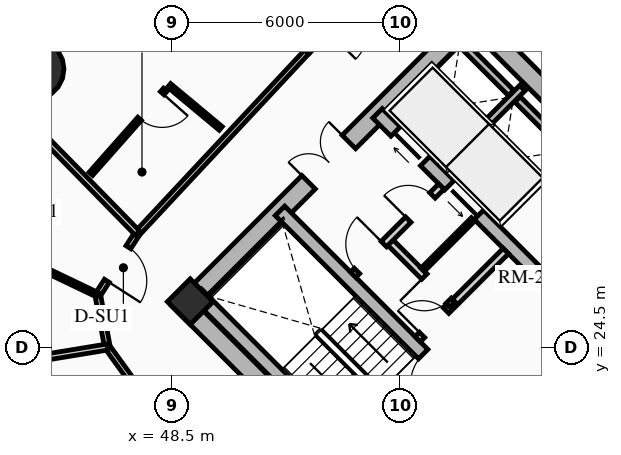
"""IFC4 building model, lengths in metres.
Left out: names, types, materials, properties, quantities, classifications, styles, units other than length and angle.
Written with IfcOpenShell. Run it as: python <this file> out.ifc"""

import sys

from ifc_helpers import new_model, si_unit, direction, frame, frame_2d, origin, origin_2d, place, context, subcontext, project, spatial, rectangle, circle, extrude, source, transform, mapped, element, fill, save


model = new_model("IFC4")
c1 = context("Model", 3, precision=1e-05, world=origin(), true_north=direction((0.0, 1.0)))
c2 = subcontext(c1, "Body", "Model", "MODEL_VIEW")
j1 = project(units=[si_unit("LENGTHUNIT", "METRE"), si_unit("PLANEANGLEUNIT", "RADIAN")], contexts=[c1])
p1 = place(None, origin())
s1 = spatial("IfcSite", under=j1, at=p1, CompositionType="ELEMENT")
p2 = place(p1, origin())
s2 = spatial("IfcBuilding", under=s1, at=p2, CompositionType="ELEMENT")
p3 = place(p2, frame((0.0, 0.0, 36.55)))
s3 = spatial("IfcBuildingStorey", under=s2, at=p3, CompositionType="ELEMENT", Elevation=36.55)
for number, where, z_axis, x_axis in (
    (1, (58.773, 15.661, 0.0), (0.0, 0.0, 1.0), (-0.707, 0.707, 0.0)),
    (2, (66.339, 23.227, 0.0), (0.0, 0.0, 1.0), (-0.707, 0.707, 0.0)),
):
    element("IfcWall", number, at=place(p3, frame(where, z_axis=z_axis, x_axis=x_axis)), inside=s3, PredefinedType="SHEAR", context=c2, shape_type="SweptSolid", body=[
        extrude(rectangle(XDim=14.3, YDim=0.5, at=frame_2d((7.15, 0.0))), origin(), (0.0, 0.0, 1.0), 2.91),
    ])
p4 = place(p3, frame((48.838, 25.596, 0.0), z_axis=(0.0, 0.0, 1.0), x_axis=(0.707106781187, 0.707106781187, 0.0)))
e3 = element("IfcWall", 3, at=p4, inside=s3, PredefinedType="SHEAR", context=c2, shape_type="SweptSolid", body=[
    extrude(rectangle(XDim=10.7, YDim=0.5, at=frame_2d((5.35, 0.0))), origin(), (0.0, 0.0, 1.0), 2.91),
])
m1 = source(origin(), c2, "Body", "SweptSolid", [
    extrude(rectangle(XDim=1.5, YDim=2.02, at=frame_2d((0.75, 1.01))), frame((0.0, 0.26, 0.0), z_axis=(0.0, -1.0, 0.0), x_axis=(1.0, 0.0, 0.0)), (0.0, 0.0, 1.0), 0.52),
])
p5 = place(p4, frame((4.6, 0.0, 0.0)))
e4 = element("IfcOpeningElement", 4, at=p5, cuts=e3, PredefinedType="OPENING", context=c2, shape_type="MappedRepresentation", body=[
    mapped(m1, transform((0.0, 0.0, 0.0), x_axis=(1.0, 0.0, 0.0), y_axis=(0.0, 1.0, 0.0), z_axis=(0.0, 0.0, 1.0), scale=1.0)),
])
p6 = place(p3, frame((61.096, 18.338, 0.0), z_axis=(0.0, 0.0, 1.0), x_axis=(-0.707106781187, 0.707106781187, 0.0)))
e5 = element("IfcWall", 5, at=p6, inside=s3, PredefinedType="SHEAR", context=c2, shape_type="SweptSolid", body=[
    extrude(rectangle(XDim=13.8, YDim=0.35, at=frame_2d((6.9, 0.0))), origin(), (0.0, 0.0, 1.0), 2.91),
])
m2 = source(origin(), c2, "Body", "SweptSolid", [
    extrude(rectangle(XDim=1.1, YDim=2.015, at=frame_2d((0.55, 1.007))), frame((0.0, 0.185, 0.0), z_axis=(0.0, -1.0, 0.0), x_axis=(1.0, 0.0, 0.0)), (0.0, 0.0, 1.0), 0.37),
])
p7 = place(p6, frame((4.9, 0.0, 0.0)))
e6 = element("IfcOpeningElement", 6, at=p7, cuts=e5, PredefinedType="OPENING", context=c2, shape_type="MappedRepresentation", body=[
    mapped(m2, transform((0.0, 0.0, 0.0), x_axis=(1.0, 0.0, 0.0), y_axis=(0.0, 1.0, 0.0), z_axis=(0.0, 0.0, 1.0), scale=1.0)),
])
m3 = source(origin(), c2, "Body", "SweptSolid", [
    extrude(rectangle(XDim=1.15, YDim=2.02, at=frame_2d((0.575, 1.01))), frame((0.0, 0.185, 0.0), z_axis=(0.0, -1.0, 0.0), x_axis=(1.0, 0.0, 0.0)), (0.0, 0.0, 1.0), 0.37),
])
p8 = place(p6, frame((7.32, 0.0, 0.0)))
e7 = element("IfcOpeningElement", 7, at=p8, cuts=e5, PredefinedType="OPENING", context=c2, shape_type="MappedRepresentation", body=[
    mapped(m3, transform((0.0, 0.0, 0.0), x_axis=(1.0, 0.0, 0.0), y_axis=(0.0, 1.0, 0.0), z_axis=(0.0, 0.0, 1.0), scale=1.0)),
])
p9 = place(p3, frame((63.662, 20.904, 0.0), z_axis=(0.0, 0.0, 1.0), x_axis=(-0.707106781187, 0.707106781187, 0.0)))
e8 = element("IfcWall", 8, at=p9, inside=s3, PredefinedType="SHEAR", context=c2, shape_type="SweptSolid", body=[
    extrude(rectangle(XDim=13.8, YDim=0.35, at=frame_2d((6.9, 0.0))), origin(), (0.0, 0.0, 1.0), 2.91),
])
p10 = place(p9, frame((10.025, 0.0, 0.0)))
e9 = element("IfcOpeningElement", 9, at=p10, cuts=e8, PredefinedType="OPENING", context=c2, shape_type="MappedRepresentation", body=[
    mapped(m2, transform((0.0, 0.0, 0.0), x_axis=(1.0, 0.0, 0.0), y_axis=(0.0, 1.0, 0.0), z_axis=(0.0, 0.0, 1.0), scale=1.0)),
])
p11 = place(p9, frame((12.025, 0.0, 0.0)))
e10 = element("IfcOpeningElement", 10, at=p11, cuts=e8, PredefinedType="OPENING", context=c2, shape_type="MappedRepresentation", body=[
    mapped(m2, transform((0.0, 0.0, 0.0), x_axis=(1.0, 0.0, 0.0), y_axis=(0.0, 1.0, 0.0), z_axis=(0.0, 0.0, 1.0), scale=1.0)),
])
p12 = place(p9, frame((5.33, 0.0, 0.0)))
e11 = element("IfcOpeningElement", 11, at=p12, cuts=e8, PredefinedType="OPENING", context=c2, shape_type="MappedRepresentation", body=[
    mapped(m3, transform((0.0, 0.0, 0.0), x_axis=(1.0, 0.0, 0.0), y_axis=(0.0, 1.0, 0.0), z_axis=(0.0, 0.0, 1.0), scale=1.0)),
])
p13 = place(p3, frame((53.922, 21.141, 0.0), z_axis=(0.0, 0.0, 1.0), x_axis=(-0.707106781187, 0.707106781187, 0.0)))
e12 = element("IfcWall", 12, at=p13, inside=s3, PredefinedType="SHEAR", context=c2, shape_type="SweptSolid", body=[
    extrude(rectangle(XDim=6.745, YDim=0.35, at=frame_2d((3.373, 0.0))), origin(), (0.0, 0.0, 1.0), 2.91),
])
p14 = place(p3, frame((48.976, 25.706, 0.0), z_axis=(0.0, 0.0, 1.0), x_axis=(0.707106781187, 0.707106781187, 0.0)))
e13 = element("IfcColumn", 13, at=p14, inside=s3, PredefinedType="COLUMN", context=c2, shape_type="SweptSolid", body=[
    extrude(rectangle(XDim=0.85, YDim=0.85, at=origin_2d()), origin(), (0.0, 0.0, 1.0), 2.91),
])
p15 = place(p3, frame((44.854, 31.827, 0.0), z_axis=(0.0, 0.0, 1.0), x_axis=(1.0, 0.0, 0.0)))
e14 = element("IfcColumn", 14, at=p15, inside=s3, PredefinedType="USERDEFINED", context=c2, shape_type="SweptSolid", body=[
    extrude(circle(Radius=0.8, at=origin_2d()), origin(), (0.0, 0.0, 1.0), 2.91),
])
p16 = place(p3, frame((57.062, 27.781, 0.0), z_axis=(0.0, 0.0, 1.0), x_axis=(0.707106781187, 0.707106781187, 0.0)))
e15 = element("IfcWall", 15, at=p16, inside=s3, PredefinedType="SHEAR", context=c2, shape_type="SweptSolid", body=[
    extrude(rectangle(XDim=2.97, YDim=0.2, at=frame_2d((1.485, 0.0))), origin(), (0.0, 0.0, 1.0), 2.91),
])
p17 = place(p3, frame((55.615, 29.227, 0.0), z_axis=(0.0, 0.0, 1.0), x_axis=(0.707147878904, 0.70706568108, 0.0)))
e16 = element("IfcWall", 16, at=p17, inside=s3, PredefinedType="SHEAR", context=c2, shape_type="SweptSolid", body=[
    extrude(rectangle(XDim=2.97, YDim=0.2, at=frame_2d((1.485, 0.0))), origin(), (0.0, 0.0, 1.0), 2.91),
])
p18 = place(p3, frame((58.865, 29.754, 0.0), z_axis=(0.0, 0.0, 1.0), x_axis=(-0.707174411312, 0.707039144592, 0.0)))
e17 = element("IfcWall", 17, at=p18, inside=s3, PredefinedType="SHEAR", context=c2, shape_type="SweptSolid", body=[
    extrude(rectangle(XDim=1.805, YDim=0.2, at=frame_2d((0.902, 0.0))), origin(), (0.0, 0.0, 1.0), 2.91),
])
p19 = place(p3, frame((57.419, 31.2, 0.0), z_axis=(0.0, 0.0, 1.0), x_axis=(-0.707032117043, 0.707181437447, 0.0)))
e18 = element("IfcWall", 18, at=p19, inside=s3, PredefinedType="SHEAR", context=c2, shape_type="SweptSolid", body=[
    extrude(rectangle(XDim=1.635, YDim=0.2, at=frame_2d((0.817, 0.0))), origin(), (0.0, 0.0, 1.0), 2.91),
])
p20 = place(p3, frame((58.214, 21.467, 0.0), z_axis=(0.0, 0.0, 1.0), x_axis=(0.707106781187, 0.707106781187, 0.0)))
e19 = element("IfcWall", 19, at=p20, inside=s3, PredefinedType="PARTITIONING", context=c2, shape_type="SweptSolid", body=[
    extrude(rectangle(XDim=3.28, YDim=0.2, at=frame_2d((1.64, 0.0))), origin(), (0.0, 0.0, 1.0), 2.635),
])
m4 = source(origin(), c2, "Body", "SweptSolid", [
    extrude(rectangle(XDim=1.5, YDim=2.02, at=frame_2d((0.75, 1.01))), frame((0.0, 0.11, 0.0), z_axis=(0.0, -1.0, 0.0), x_axis=(1.0, 0.0, 0.0)), (0.0, 0.0, 1.0), 0.22),
])
p21 = place(p20, frame((1.55, 0.0, 0.0)))
e20 = element("IfcOpeningElement", 20, at=p21, cuts=e19, PredefinedType="OPENING", context=c2, shape_type="MappedRepresentation", body=[
    mapped(m4, transform((0.0, 0.0, 0.0), x_axis=(1.0, 0.0, 0.0), y_axis=(0.0, 1.0, 0.0), z_axis=(0.0, 0.0, 1.0), scale=1.0)),
])
p22 = place(p3, frame((54.961, 24.719, 0.0), z_axis=(0.0, 0.0, 1.0), x_axis=(0.707106781187, 0.707106781187, 0.0)))
e21 = element("IfcWall", 21, at=p22, inside=s3, PredefinedType="PARTITIONING", context=c2, shape_type="SweptSolid", body=[
    extrude(rectangle(XDim=3.28, YDim=0.2, at=frame_2d((1.64, 0.0))), origin(), (0.0, 0.0, 1.0), 2.635),
])
m5 = source(origin(), c2, "Body", "SweptSolid", [
    extrude(rectangle(XDim=0.9, YDim=2.005, at=frame_2d((0.45, 1.002))), frame((0.0, 0.11, 0.0), z_axis=(0.0, -1.0, 0.0), x_axis=(1.0, 0.0, 0.0)), (0.0, 0.0, 1.0), 0.22),
])
p23 = place(p22, frame((0.16, 0.0, 0.0)))
e22 = element("IfcOpeningElement", 22, at=p23, cuts=e21, PredefinedType="OPENING", context=c2, shape_type="MappedRepresentation", body=[
    mapped(m5, transform((0.0, 0.0, 0.0), x_axis=(1.0, 0.0, 0.0), y_axis=(0.0, 1.0, 0.0), z_axis=(0.0, 0.0, 1.0), scale=1.0)),
])
p24 = place(p3, frame((55.874, 25.631, 0.0), z_axis=(0.0, 0.0, 1.0), x_axis=(-0.707157639372, 0.707055919343, 0.0)))
e23 = element("IfcWall", 23, at=p24, inside=s3, PredefinedType="PARTITIONING", context=c2, shape_type="SweptSolid", body=[
    extrude(rectangle(XDim=2.4, YDim=0.2, at=frame_2d((1.2, 0.0))), origin(), (0.0, 0.0, 1.0), 2.635),
])
p25 = place(p24, frame((0.14, 0.0, 0.0)))
e24 = element("IfcOpeningElement", 24, at=p25, cuts=e23, PredefinedType="OPENING", context=c2, shape_type="MappedRepresentation", body=[
    mapped(m5, transform((0.0, 0.0, 0.0), x_axis=(1.0, 0.0, 0.0), y_axis=(0.0, 1.0, 0.0), z_axis=(0.0, 0.0, 1.0), scale=1.0)),
])
p26 = place(p3, frame((53.264, 26.416, 0.0), z_axis=(0.0, 0.0, 1.0), x_axis=(0.707106781187, 0.707106781187, 0.0)))
e25 = element("IfcWall", 25, at=p26, inside=s3, PredefinedType="PARTITIONING", context=c2, shape_type="SweptSolid", body=[
    extrude(rectangle(XDim=3.28, YDim=0.2, at=frame_2d((1.64, 0.0))), origin(), (0.0, 0.0, 1.0), 2.635),
])
m6 = source(origin(), c2, "Body", "SweptSolid", [
    extrude(rectangle(XDim=1.0, YDim=2.015, at=frame_2d((0.5, 1.007))), frame((0.0, 0.11, 0.0), z_axis=(0.0, -1.0, 0.0), x_axis=(1.0, 0.0, 0.0)), (0.0, 0.0, 1.0), 0.22),
])
p27 = place(p26, frame((0.14, 0.0, 0.0)))
e26 = element("IfcOpeningElement", 26, at=p27, cuts=e25, PredefinedType="OPENING", context=c2, shape_type="MappedRepresentation", body=[
    mapped(m6, transform((0.0, 0.0, 0.0), x_axis=(1.0, 0.0, 0.0), y_axis=(0.0, 1.0, 0.0), z_axis=(0.0, 0.0, 1.0), scale=1.0)),
])
p28 = place(p26, frame((2.05, 0.0, 0.0)))
e27 = element("IfcOpeningElement", 27, at=p28, cuts=e25, PredefinedType="OPENING", context=c2, shape_type="MappedRepresentation", body=[
    mapped(m5, transform((0.0, 0.0, 0.0), x_axis=(1.0, 0.0, 0.0), y_axis=(0.0, 1.0, 0.0), z_axis=(0.0, 0.0, 1.0), scale=1.0)),
])
p29 = place(p3, frame((55.089, 26.543, 0.0), z_axis=(0.0, 0.0, 1.0), x_axis=(0.707106781187, 0.707106781187, 0.0)))
e28 = element("IfcWall", 28, at=p29, inside=s3, PredefinedType="PARTITIONING", context=c2, shape_type="SweptSolid", body=[
    extrude(rectangle(XDim=1.88, YDim=0.125, at=frame_2d((0.94, 0.0))), origin(), (0.0, 0.0, 1.0), 2.635),
])
p30 = place(p3, frame((54.427, 34.683, 0.0), z_axis=(0.0, 0.0, 1.0), x_axis=(-0.704178989986, -0.710022499687, 0.0)))
e29 = element("IfcWall", 29, at=p30, inside=s3, PredefinedType="PARTITIONING", context=c2, shape_type="SweptSolid", body=[
    extrude(rectangle(XDim=3.384, YDim=0.15, at=frame_2d((1.692, 0.0))), origin(), (0.0, 0.0, 1.0), 2.159),
])
m7 = source(origin(), c2, "Body", "SweptSolid", [
    extrude(rectangle(XDim=1.05, YDim=2.015, at=frame_2d((0.525, 1.007))), frame((0.0, 0.085, 0.0), z_axis=(0.0, -1.0, 0.0), x_axis=(1.0, 0.0, 0.0)), (0.0, 0.0, 1.0), 0.17),
])
p31 = place(p30, frame((1.56, 0.0, 0.0)))
e30 = element("IfcOpeningElement", 30, at=p31, cuts=e29, PredefinedType="OPENING", context=c2, shape_type="MappedRepresentation", body=[
    mapped(m7, transform((0.0, 0.0, 0.0), x_axis=(1.0, 0.0, 0.0), y_axis=(0.0, 1.0, 0.0), z_axis=(0.0, 0.0, 1.0), scale=1.0)),
])
p32 = place(p3, frame((52.043, 32.28, 0.0), z_axis=(0.0, 0.0, 1.0), x_axis=(-0.682606081633, -0.730786519661, 0.0)))
e31 = element("IfcWall", 31, at=p32, inside=s3, PredefinedType="PARTITIONING", context=c2, shape_type="SweptSolid", body=[
    extrude(rectangle(XDim=6.527, YDim=0.15, at=frame_2d((3.263, 0.0))), origin(), (0.0, 0.0, 1.0), 2.159),
])
p33 = place(p3, frame((47.588, 27.51, 0.0), z_axis=(0.0, 0.0, 1.0), x_axis=(-0.540202619347, -0.841534984449, 0.0)))
e32 = element("IfcWall", 32, at=p33, inside=s3, PredefinedType="PARTITIONING", context=c2, shape_type="SweptSolid", body=[
    extrude(rectangle(XDim=1.935, YDim=0.15, at=frame_2d((0.967, 0.0))), origin(), (0.0, 0.0, 1.0), 2.159),
])
p34 = place(p33, frame((0.442, 0.0, 0.0)))
e33 = element("IfcOpeningElement", 33, at=p34, cuts=e32, PredefinedType="OPENING", context=c2, shape_type="MappedRepresentation", body=[
    mapped(m7, transform((0.0, 0.0, 0.0), x_axis=(1.0, 0.0, 0.0), y_axis=(0.0, 1.0, 0.0), z_axis=(0.0, 0.0, 1.0), scale=1.0)),
])
p35 = place(p3, frame((46.543, 25.882, 0.0), z_axis=(0.0, 0.0, 1.0), x_axis=(0.181153502579, -0.983454832976, 0.0)))
e34 = element("IfcWall", 34, at=p35, inside=s3, PredefinedType="PARTITIONING", context=c2, shape_type="SweptSolid", body=[
    extrude(rectangle(XDim=1.392, YDim=0.15, at=frame_2d((0.696, 0.0))), origin(), (0.0, 0.0, 1.0), 2.159),
])
p36 = place(p3, frame((46.795, 24.513, 0.0), z_axis=(0.0, 0.0, 1.0), x_axis=(0.585628197524, -0.810579801294, 0.0)))
e35 = element("IfcWall", 35, at=p36, inside=s3, PredefinedType="PARTITIONING", context=c2, shape_type="SweptSolid", body=[
    extrude(rectangle(XDim=1.554, YDim=0.15, at=frame_2d((0.777, 0.0))), origin(), (0.0, 0.0, 1.0), 2.205),
])
p37 = place(p3, frame((47.588, 27.51, 0.0), z_axis=(0.0, 0.0, 1.0), x_axis=(-0.699371977892, 0.714757886657, 0.0)))
e36 = element("IfcWall", 36, at=p37, inside=s3, PredefinedType="PARTITIONING", context=c2, shape_type="SweptSolid", body=[
    extrude(rectangle(XDim=8.886, YDim=0.16, at=frame_2d((4.443, 0.0))), origin(), (0.0, 0.0, 1.0), 2.073),
])
p38 = place(p3, frame((46.795, 24.513, 0.0), z_axis=(0.0, 0.0, 1.0), x_axis=(-0.986729986004, -0.162369746937, 0.0)))
e37 = element("IfcWall", 37, at=p38, inside=s3, PredefinedType="PARTITIONING", context=c2, shape_type="SweptSolid", body=[
    extrude(rectangle(XDim=6.108, YDim=0.16, at=frame_2d((3.054, 0.0))), origin(), (0.0, 0.0, 1.0), 2.073),
])
p39 = place(p3, frame((49.78, 30.264, 0.0), z_axis=(0.0, 0.0, 1.0), x_axis=(-0.768209972595, 0.640197967824, 0.0)))
e38 = element("IfcWall", 38, at=p39, inside=s3, PredefinedType="PARTITIONING", context=c2, shape_type="SweptSolid", body=[
    extrude(rectangle(XDim=1.77, YDim=0.125, at=frame_2d((0.885, 0.0))), origin(), (0.0, 0.0, 1.0), 2.635),
])
p40 = place(p3, frame((48.318, 31.282, 0.0), z_axis=(0.0, 0.0, 1.0), x_axis=(-0.662365127428, -0.749181178333, 0.0)))
e39 = element("IfcWall", 39, at=p40, inside=s3, PredefinedType="PARTITIONING", context=c2, shape_type="SweptSolid", body=[
    extrude(rectangle(XDim=2.953, YDim=0.125, at=frame_2d((1.477, 0.0))), origin(), (0.0, 0.0, 1.0), 2.159),
])
m8 = source(origin(), c2, "Body", "SweptSolid", [
    extrude(rectangle(XDim=0.9, YDim=2.005, at=frame_2d((0.45, 1.002))), frame((0.0, 0.073, 0.0), z_axis=(0.0, -1.0, 0.0), x_axis=(1.0, 0.0, 0.0)), (0.0, 0.0, 1.0), 0.145),
])
p41 = place(p40, frame((0.12, 0.0, 0.0)))
e40 = element("IfcOpeningElement", 40, at=p41, cuts=e39, PredefinedType="OPENING", context=c2, shape_type="MappedRepresentation", body=[
    mapped(m8, transform((0.0, 0.0, 0.0), x_axis=(1.0, 0.0, 0.0), y_axis=(0.0, 1.0, 0.0), z_axis=(0.0, 0.0, 1.0), scale=1.0)),
])
p42 = place(p3, frame((46.543, 25.882, 0.0), z_axis=(0.0, 0.0, 1.0), x_axis=(-0.901937110034, 0.431867398103, 0.0)))
e41 = element("IfcWall", 41, at=p42, inside=s3, PredefinedType="PARTITIONING", context=c2, shape_type="SweptSolid", body=[
    extrude(rectangle(XDim=7.004, YDim=0.125, at=frame_2d((3.502, 0.0))), origin(), (0.0, 0.0, 1.0), 2.073),
])
p43 = place(p42, frame((1.8, 0.0, 0.0)))
e42 = element("IfcOpeningElement", 42, at=p43, cuts=e41, PredefinedType="OPENING", context=c2, shape_type="MappedRepresentation", body=[
    mapped(m8, transform((0.0, 0.0, 0.0), x_axis=(1.0, 0.0, 0.0), y_axis=(0.0, 1.0, 0.0), z_axis=(0.0, 0.0, 1.0), scale=1.0)),
])
m9 = source(origin(), c2, "Body", "SweptSolid", [
    extrude(rectangle(XDim=1.1, YDim=2.015, at=frame_2d((0.55, 1.007))), frame((0.0, 0.025, 0.0), z_axis=(0.0, -1.0, 0.0), x_axis=(1.0, 0.0, 0.0)), (0.0, 0.0, 1.0), 0.05),
])
p44 = place(p10, origin())
e43 = element("IfcDoor", 43, at=p44, inside=s3, OperationType="SLIDING_TO_LEFT", PredefinedType="DOOR", context=c2, shape_type="MappedRepresentation", body=[
    mapped(m9, transform((0.0, 0.0, 0.0), x_axis=(1.0, 0.0, 0.0), y_axis=(0.0, 1.0, 0.0), z_axis=(0.0, 0.0, 1.0), scale=1.0)),
])
fill(e9, e43)
p45 = place(p11, origin())
e44 = element("IfcDoor", 44, at=p45, inside=s3, OperationType="SLIDING_TO_RIGHT", PredefinedType="DOOR", context=c2, shape_type="MappedRepresentation", body=[
    mapped(m9, transform((0.0, 0.0, 0.0), x_axis=(1.0, 0.0, 0.0), y_axis=(0.0, 1.0, 0.0), z_axis=(0.0, 0.0, 1.0), scale=1.0)),
])
fill(e10, e44)
m10 = source(origin(), c2, "Body", "SweptSolid", [
    extrude(rectangle(XDim=1.15, YDim=2.02, at=frame_2d((0.575, 1.01))), frame((0.0, 0.025, 0.0), z_axis=(0.0, -1.0, 0.0), x_axis=(1.0, 0.0, 0.0)), (0.0, 0.0, 1.0), 0.05),
])
p46 = place(p8, origin())
e45 = element("IfcDoor", 45, at=p46, inside=s3, OperationType="SINGLE_SWING_LEFT", PredefinedType="DOOR", context=c2, shape_type="MappedRepresentation", body=[
    mapped(m10, transform((0.0, 0.0, 0.0), x_axis=(1.0, 0.0, 0.0), y_axis=(0.0, 1.0, 0.0), z_axis=(0.0, 0.0, 1.0), scale=1.0)),
])
fill(e7, e45)
m11 = source(origin(), c2, "Body", "SweptSolid", [
    extrude(rectangle(XDim=1.5, YDim=2.02, at=frame_2d((0.75, 1.01))), frame((0.0, 0.025, 0.0), z_axis=(0.0, -1.0, 0.0), x_axis=(1.0, 0.0, 0.0)), (0.0, 0.0, 1.0), 0.05),
])
p47 = place(p5, origin())
e46 = element("IfcDoor", 46, at=p47, inside=s3, OperationType="DOUBLE_DOOR_SINGLE_SWING", PredefinedType="DOOR", context=c2, shape_type="MappedRepresentation", body=[
    mapped(m11, transform((0.0, 0.0, 0.0), x_axis=(1.0, 0.0, 0.0), y_axis=(0.0, 1.0, 0.0), z_axis=(0.0, 0.0, 1.0), scale=1.0)),
])
fill(e4, e46)
m12 = source(origin(), c2, "Body", "SweptSolid", [
    extrude(rectangle(XDim=0.9, YDim=2.005, at=frame_2d((0.45, 1.002))), frame((0.0, 0.025, 0.0), z_axis=(0.0, -1.0, 0.0), x_axis=(1.0, 0.0, 0.0)), (0.0, 0.0, 1.0), 0.05),
])
p48 = place(p23, origin())
e47 = element("IfcDoor", 47, at=p48, inside=s3, OperationType="SINGLE_SWING_LEFT", PredefinedType="DOOR", context=c2, shape_type="MappedRepresentation", body=[
    mapped(m12, transform((0.0, 0.0, 0.0), x_axis=(1.0, 0.0, 0.0), y_axis=(0.0, 1.0, 0.0), z_axis=(0.0, 0.0, 1.0), scale=1.0)),
])
fill(e22, e47)
m13 = source(origin(), c2, "Body", "SweptSolid", [
    extrude(rectangle(XDim=1.0, YDim=2.015, at=frame_2d((0.5, 1.007))), frame((0.0, 0.025, 0.0), z_axis=(0.0, -1.0, 0.0), x_axis=(1.0, 0.0, 0.0)), (0.0, 0.0, 1.0), 0.05),
])
p49 = place(p27, origin())
e48 = element("IfcDoor", 48, at=p49, inside=s3, OperationType="SINGLE_SWING_RIGHT", PredefinedType="DOOR", context=c2, shape_type="MappedRepresentation", body=[
    mapped(m13, transform((0.0, 0.0, 0.0), x_axis=(1.0, 0.0, 0.0), y_axis=(0.0, 1.0, 0.0), z_axis=(0.0, 0.0, 1.0), scale=1.0)),
])
fill(e26, e48)
p50 = place(p25, origin())
e49 = element("IfcDoor", 49, at=p50, inside=s3, OperationType="SINGLE_SWING_RIGHT", PredefinedType="DOOR", context=c2, shape_type="MappedRepresentation", body=[
    mapped(m12, transform((0.0, 0.0, 0.0), x_axis=(1.0, 0.0, 0.0), y_axis=(0.0, 1.0, 0.0), z_axis=(0.0, 0.0, 1.0), scale=1.0)),
])
fill(e24, e49)
p51 = place(p28, origin())
e50 = element("IfcDoor", 50, at=p51, inside=s3, OperationType="SINGLE_SWING_LEFT", PredefinedType="DOOR", context=c2, shape_type="MappedRepresentation", body=[
    mapped(m12, transform((0.0, 0.0, 0.0), x_axis=(1.0, 0.0, 0.0), y_axis=(0.0, 1.0, 0.0), z_axis=(0.0, 0.0, 1.0), scale=1.0)),
])
fill(e27, e50)
p52 = place(p41, origin())
e51 = element("IfcDoor", 51, at=p52, inside=s3, OperationType="SINGLE_SWING_LEFT", PredefinedType="DOOR", context=c2, shape_type="MappedRepresentation", body=[
    mapped(m12, transform((0.0, 0.0, 0.0), x_axis=(1.0, 0.0, 0.0), y_axis=(0.0, 1.0, 0.0), z_axis=(0.0, 0.0, 1.0), scale=1.0)),
])
fill(e40, e51)
m14 = source(origin(), c2, "Body", "SweptSolid", [
    extrude(rectangle(XDim=1.05, YDim=2.015, at=frame_2d((0.525, 1.007))), frame((0.0, 0.025, 0.0), z_axis=(0.0, -1.0, 0.0), x_axis=(1.0, 0.0, 0.0)), (0.0, 0.0, 1.0), 0.05),
])
p53 = place(p34, origin())
e52 = element("IfcDoor", 52, at=p53, inside=s3, OperationType="SINGLE_SWING_RIGHT", PredefinedType="DOOR", context=c2, shape_type="MappedRepresentation", body=[
    mapped(m14, transform((0.0, 0.0, 0.0), x_axis=(1.0, 0.0, 0.0), y_axis=(0.0, 1.0, 0.0), z_axis=(0.0, 0.0, 1.0), scale=1.0)),
])
fill(e33, e52)
save(model, sys.argv[1])
